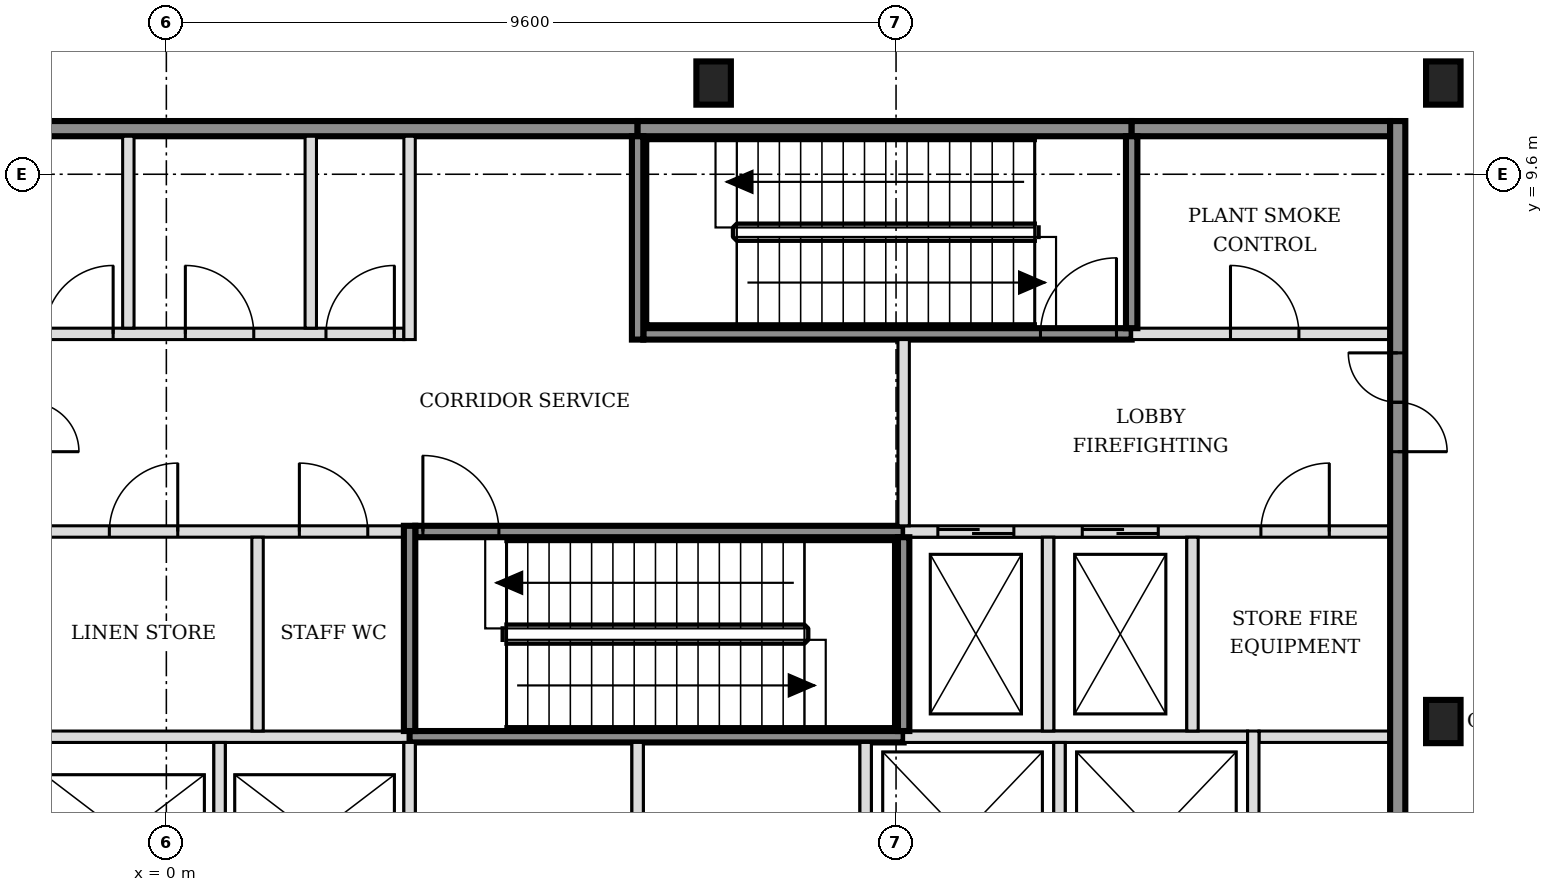
"""IFC4 building model, lengths in metres.
Left out: names, types, materials, properties, quantities, classifications, styles, units other than length and angle.
Written with IfcOpenShell. Run it as: python <this file> out.ifc"""

import sys

from ifc_helpers import new_model, si_unit, direction, frame, frame_2d, origin, origin_2d, place, context, subcontext, project, spatial, rectangle, i_section, extrude, element, fill, save


model = new_model("IFC4")
c1 = context("Model", 3, precision=1e-05, world=origin(), true_north=direction((0.0, 1.0)))
c2 = subcontext(c1, "Body", "Model", "MODEL_VIEW")
j1 = project(units=[si_unit("LENGTHUNIT", "METRE"), si_unit("PLANEANGLEUNIT", "RADIAN")], contexts=[c1])
p1 = place(None, origin())
s1 = spatial("IfcSite", under=j1, at=p1, CompositionType="ELEMENT")
p2 = place(p1, origin())
s2 = spatial("IfcBuilding", under=s1, at=p2, CompositionType="ELEMENT")
p3 = place(p2, frame((0.0, 0.0, 35.4)))
s3 = spatial("IfcBuildingStorey", under=s2, at=p3, CompositionType="ELEMENT", Elevation=35.4)
for number, where, z_axis, x_axis in (
    (1, (16.8, 2.4, -0.2), (0.0, 0.0, 1.0), (1.0, 0.0, 0.0)),
    (2, (7.2, 10.8, -0.2), (0.0, 0.0, 1.0), (1.0, 0.0, 0.0)),
    (3, (16.8, 10.8, -0.2), (0.0, 0.0, 1.0), (1.0, 0.0, 0.0)),
):
    element("IfcColumn", number, at=place(p3, frame(where, z_axis=z_axis, x_axis=x_axis)), inside=s3, PredefinedType="COLUMN", context=c2, shape_type="SweptSolid", body=[
        extrude(i_section(OverallWidth=0.454, OverallDepth=0.569, WebThickness=0.078, FlangeThickness=0.125, FilletRadius=0.015, at=origin_2d()), origin(), (0.0, 0.0, 1.0), 4.85),
    ])
p4 = place(p3, frame((-1.7, 2.2, 0.0), z_axis=(0.0, 0.0, 1.0), x_axis=(1.0, 0.0, 0.0)))
e4 = element("IfcWall", 4, at=p4, inside=s3, PredefinedType="SOLIDWALL", context=c2, shape_type="SweptSolid", body=[
    extrude(rectangle(XDim=4.9, YDim=0.15, at=frame_2d((2.45, 0.0))), origin(), (0.0, 0.0, 1.0), 4.65),
])
p5 = place(p3, frame((3.2, 2.2, 0.0), z_axis=(0.0, 0.0, 1.0), x_axis=(1.0, 0.0, 0.0)))
e5 = element("IfcWall", 5, at=p5, inside=s3, PredefinedType="SOLIDWALL", context=c2, shape_type="SweptSolid", body=[
    extrude(rectangle(XDim=6.5, YDim=0.15, at=frame_2d((3.25, 0.0))), origin(), (0.0, 0.0, 1.0), 4.65),
])
p6 = place(p3, frame((9.7, 2.2, 0.0), z_axis=(0.0, 0.0, 1.0), x_axis=(1.0, 0.0, 0.0)))
e6 = element("IfcWall", 6, at=p6, inside=s3, PredefinedType="SOLIDWALL", context=c2, shape_type="SweptSolid", body=[
    extrude(rectangle(XDim=4.525, YDim=0.15, at=frame_2d((2.263, 0.0))), origin(), (0.0, 0.0, 1.0), 4.65),
])
p7 = place(p3, frame((14.375, 2.2, 0.0), z_axis=(0.0, 0.0, 1.0), x_axis=(1.0, 0.0, 0.0)))
e7 = element("IfcWall", 7, at=p7, inside=s3, PredefinedType="PARTITIONING", context=c2, shape_type="SweptSolid", body=[
    extrude(rectangle(XDim=1.725, YDim=0.15, at=frame_2d((0.863, 0.0))), origin(), (0.0, 0.0, 1.0), 4.65),
])
p8 = place(p3, frame((-1.7, 4.9, 0.0), z_axis=(0.0, 0.0, 1.0), x_axis=(1.0, 0.0, 0.0)))
e8 = element("IfcWall", 8, at=p8, inside=s3, PredefinedType="PARTITIONING", context=c2, shape_type="SweptSolid", body=[
    extrude(rectangle(XDim=4.825, YDim=0.15, at=frame_2d((2.413, 0.0))), origin(), (0.0, 0.0, 1.0), 4.65),
])
p9 = place(p8, frame((0.95, 0.0, 0.0)))
e9 = element("IfcOpeningElement", 9, at=p9, cuts=e8, PredefinedType="OPENING", context=c2, shape_type="SweptSolid", body=[
    extrude(rectangle(XDim=0.9, YDim=2.1, at=frame_2d((0.45, 1.05))), frame((0.0, 0.085, 0.0), z_axis=(0.0, -1.0, 0.0), x_axis=(1.0, 0.0, 0.0)), (0.0, 0.0, 1.0), 0.17),
])
p10 = place(p8, frame((3.45, 0.0, 0.0)))
e10 = element("IfcOpeningElement", 10, at=p10, cuts=e8, PredefinedType="OPENING", context=c2, shape_type="SweptSolid", body=[
    extrude(rectangle(XDim=0.9, YDim=2.1, at=frame_2d((0.45, 1.05))), frame((0.0, 0.085, 0.0), z_axis=(0.0, -1.0, 0.0), x_axis=(1.0, 0.0, 0.0)), (0.0, 0.0, 1.0), 0.17),
])
p11 = place(p3, frame((3.275, 4.9, 0.0), z_axis=(0.0, 0.0, 1.0), x_axis=(1.0, 0.0, 0.0)))
e11 = element("IfcWall", 11, at=p11, inside=s3, PredefinedType="SOLIDWALL", context=c2, shape_type="SweptSolid", body=[
    extrude(rectangle(XDim=6.425, YDim=0.15, at=frame_2d((3.212, 0.0))), origin(), (0.0, 0.0, 1.0), 4.65),
])
p12 = place(p11, frame((0.1, 0.0, 0.0)))
e12 = element("IfcOpeningElement", 12, at=p12, cuts=e11, PredefinedType="OPENING", context=c2, shape_type="SweptSolid", body=[
    extrude(rectangle(XDim=1.0, YDim=2.1, at=frame_2d((0.5, 1.05))), frame((0.0, 0.085, 0.0), z_axis=(0.0, -1.0, 0.0), x_axis=(1.0, 0.0, 0.0)), (0.0, 0.0, 1.0), 0.17),
])
p13 = place(p3, frame((9.7, 4.9, 0.0), z_axis=(0.0, 0.0, 1.0), x_axis=(1.0, 0.0, 0.0)))
e13 = element("IfcWall", 13, at=p13, inside=s3, PredefinedType="SOLIDWALL", context=c2, shape_type="SweptSolid", body=[
    extrude(rectangle(XDim=6.4, YDim=0.15, at=frame_2d((3.2, 0.0))), origin(), (0.0, 0.0, 1.0), 4.65),
])
p14 = place(p13, frame((0.45, 0.0, 0.0)))
e14 = element("IfcOpeningElement", 14, at=p14, cuts=e13, PredefinedType="OPENING", context=c2, shape_type="SweptSolid", body=[
    extrude(rectangle(XDim=1.0, YDim=2.1, at=frame_2d((0.5, 1.05))), frame((0.0, 0.085, 0.0), z_axis=(0.0, -1.0, 0.0), x_axis=(1.0, 0.0, 0.0)), (0.0, 0.0, 1.0), 0.17),
])
p15 = place(p13, frame((2.35, 0.0, 0.0)))
e15 = element("IfcOpeningElement", 15, at=p15, cuts=e13, PredefinedType="OPENING", context=c2, shape_type="SweptSolid", body=[
    extrude(rectangle(XDim=1.0, YDim=2.1, at=frame_2d((0.5, 1.05))), frame((0.0, 0.085, 0.0), z_axis=(0.0, -1.0, 0.0), x_axis=(1.0, 0.0, 0.0)), (0.0, 0.0, 1.0), 0.17),
])
p16 = place(p13, frame((4.7, 0.0, 0.0)))
e16 = element("IfcOpeningElement", 16, at=p16, cuts=e13, PredefinedType="OPENING", context=c2, shape_type="SweptSolid", body=[
    extrude(rectangle(XDim=0.9, YDim=2.1, at=frame_2d((0.45, 1.05))), frame((0.0, 0.085, 0.0), z_axis=(0.0, -1.0, 0.0), x_axis=(1.0, 0.0, 0.0)), (0.0, 0.0, 1.0), 0.17),
])
p17 = place(p3, frame((-1.7, 7.5, 0.0), z_axis=(0.0, 0.0, 1.0), x_axis=(1.0, 0.0, 0.0)))
e17 = element("IfcWall", 17, at=p17, inside=s3, PredefinedType="PARTITIONING", context=c2, shape_type="SweptSolid", body=[
    extrude(rectangle(XDim=4.825, YDim=0.15, at=frame_2d((2.413, 0.0))), origin(), (0.0, 0.0, 1.0), 4.65),
])
p18 = place(p17, frame((0.1, 0.0, 0.0)))
e18 = element("IfcOpeningElement", 18, at=p18, cuts=e17, PredefinedType="OPENING", context=c2, shape_type="SweptSolid", body=[
    extrude(rectangle(XDim=0.9, YDim=2.1, at=frame_2d((0.45, 1.05))), frame((0.0, 0.085, 0.0), z_axis=(0.0, -1.0, 0.0), x_axis=(1.0, 0.0, 0.0)), (0.0, 0.0, 1.0), 0.17),
])
p19 = place(p17, frame((1.95, 0.0, 0.0)))
e19 = element("IfcOpeningElement", 19, at=p19, cuts=e17, PredefinedType="OPENING", context=c2, shape_type="SweptSolid", body=[
    extrude(rectangle(XDim=0.9, YDim=2.1, at=frame_2d((0.45, 1.05))), frame((0.0, 0.085, 0.0), z_axis=(0.0, -1.0, 0.0), x_axis=(1.0, 0.0, 0.0)), (0.0, 0.0, 1.0), 0.17),
])
p20 = place(p17, frame((3.8, 0.0, 0.0)))
e20 = element("IfcOpeningElement", 20, at=p20, cuts=e17, PredefinedType="OPENING", context=c2, shape_type="SweptSolid", body=[
    extrude(rectangle(XDim=0.9, YDim=2.1, at=frame_2d((0.45, 1.05))), frame((0.0, 0.085, 0.0), z_axis=(0.0, -1.0, 0.0), x_axis=(1.0, 0.0, 0.0)), (0.0, 0.0, 1.0), 0.17),
])
p21 = place(p3, frame((6.275, 7.5, 0.0), z_axis=(0.0, 0.0, 1.0), x_axis=(1.0, 0.0, 0.0)))
e21 = element("IfcWall", 21, at=p21, inside=s3, PredefinedType="SOLIDWALL", context=c2, shape_type="SweptSolid", body=[
    extrude(rectangle(XDim=6.425, YDim=0.15, at=frame_2d((3.212, 0.0))), origin(), (0.0, 0.0, 1.0), 4.65),
])
p22 = place(p21, frame((5.225, 0.0, 0.0)))
e22 = element("IfcOpeningElement", 22, at=p22, cuts=e21, PredefinedType="OPENING", context=c2, shape_type="SweptSolid", body=[
    extrude(rectangle(XDim=1.0, YDim=2.1, at=frame_2d((0.5, 1.05))), frame((0.0, 0.085, 0.0), z_axis=(0.0, -1.0, 0.0), x_axis=(1.0, 0.0, 0.0)), (0.0, 0.0, 1.0), 0.17),
])
p23 = place(p3, frame((12.7, 7.5, 0.0), z_axis=(0.0, 0.0, 1.0), x_axis=(1.0, 0.0, 0.0)))
e23 = element("IfcWall", 23, at=p23, inside=s3, PredefinedType="SOLIDWALL", context=c2, shape_type="SweptSolid", body=[
    extrude(rectangle(XDim=3.4, YDim=0.15, at=frame_2d((1.7, 0.0))), origin(), (0.0, 0.0, 1.0), 4.65),
])
p24 = place(p23, frame((1.3, 0.0, 0.0)))
e24 = element("IfcOpeningElement", 24, at=p24, cuts=e23, PredefinedType="OPENING", context=c2, shape_type="SweptSolid", body=[
    extrude(rectangle(XDim=0.9, YDim=2.1, at=frame_2d((0.45, 1.05))), frame((0.0, 0.085, 0.0), z_axis=(0.0, -1.0, 0.0), x_axis=(1.0, 0.0, 0.0)), (0.0, 0.0, 1.0), 0.17),
])
p25 = place(p3, frame((-1.7, 10.2, 0.0), z_axis=(0.0, 0.0, 1.0), x_axis=(1.0, 0.0, 0.0)))
e25 = element("IfcWall", 25, at=p25, inside=s3, PredefinedType="SOLIDWALL", context=c2, shape_type="SweptSolid", body=[
    extrude(rectangle(XDim=7.9, YDim=0.2, at=frame_2d((3.95, 0.0))), origin(), (0.0, 0.0, 1.0), 4.65),
])
p26 = place(p3, frame((6.2, 10.2, 0.0), z_axis=(0.0, 0.0, 1.0), x_axis=(1.0, 0.0, 0.0)))
e26 = element("IfcWall", 26, at=p26, inside=s3, PredefinedType="SOLIDWALL", context=c2, shape_type="SweptSolid", body=[
    extrude(rectangle(XDim=6.5, YDim=0.2, at=frame_2d((3.25, 0.0))), origin(), (0.0, 0.0, 1.0), 4.65),
])
p27 = place(p3, frame((12.7, 10.2, 0.0), z_axis=(0.0, 0.0, 1.0), x_axis=(1.0, 0.0, 0.0)))
e27 = element("IfcWall", 27, at=p27, inside=s3, PredefinedType="SOLIDWALL", context=c2, shape_type="SweptSolid", body=[
    extrude(rectangle(XDim=3.4, YDim=0.2, at=frame_2d((1.7, 0.0))), origin(), (0.0, 0.0, 1.0), 4.65),
])
p28 = place(p3, frame((-0.5, 7.575, 0.0), z_axis=(0.0, 0.0, 1.0), x_axis=(0.0, 1.0, 0.0)))
e28 = element("IfcWall", 28, at=p28, inside=s3, PredefinedType="PARTITIONING", context=c2, shape_type="SweptSolid", body=[
    extrude(rectangle(XDim=2.525, YDim=0.15, at=frame_2d((1.263, 0.0))), origin(), (0.0, 0.0, 1.0), 4.65),
])
p29 = place(p3, frame((0.7, -0.325, 0.0), z_axis=(0.0, 0.0, 1.0), x_axis=(0.0, 1.0, 0.0)))
e29 = element("IfcWall", 29, at=p29, inside=s3, PredefinedType="SOLIDWALL", context=c2, shape_type="SweptSolid", body=[
    extrude(rectangle(XDim=2.45, YDim=0.15, at=frame_2d((1.225, 0.0))), origin(), (0.0, 0.0, 1.0), 4.65),
])
p30 = place(p3, frame((1.2, 2.275, 0.0), z_axis=(0.0, 0.0, 1.0), x_axis=(0.0, 1.0, 0.0)))
e30 = element("IfcWall", 30, at=p30, inside=s3, PredefinedType="PARTITIONING", context=c2, shape_type="SweptSolid", body=[
    extrude(rectangle(XDim=2.55, YDim=0.15, at=frame_2d((1.275, 0.0))), origin(), (0.0, 0.0, 1.0), 4.65),
])
p31 = place(p3, frame((1.9, 7.575, 0.0), z_axis=(0.0, 0.0, 1.0), x_axis=(0.0, 1.0, 0.0)))
e31 = element("IfcWall", 31, at=p31, inside=s3, PredefinedType="PARTITIONING", context=c2, shape_type="SweptSolid", body=[
    extrude(rectangle(XDim=2.525, YDim=0.15, at=frame_2d((1.263, 0.0))), origin(), (0.0, 0.0, 1.0), 4.65),
])
p32 = place(p3, frame((3.2, -0.325, 0.0), z_axis=(0.0, 0.0, 1.0), x_axis=(0.0, 1.0, 0.0)))
e32 = element("IfcWall", 32, at=p32, inside=s3, PredefinedType="SOLIDWALL", context=c2, shape_type="SweptSolid", body=[
    extrude(rectangle(XDim=2.45, YDim=0.15, at=frame_2d((1.225, 0.0))), origin(), (0.0, 0.0, 1.0), 4.65),
])
p33 = place(p3, frame((3.2, 2.275, 0.0), z_axis=(0.0, 0.0, 1.0), x_axis=(0.0, 1.0, 0.0)))
e33 = element("IfcWall", 33, at=p33, inside=s3, PredefinedType="SOLIDWALL", context=c2, shape_type="SweptSolid", body=[
    extrude(rectangle(XDim=2.7, YDim=0.15, at=frame_2d((1.35, 0.0))), origin(), (0.0, 0.0, 1.0), 4.65),
])
p34 = place(p3, frame((3.2, 7.425, 0.0), z_axis=(0.0, 0.0, 1.0), x_axis=(0.0, 1.0, 0.0)))
e34 = element("IfcWall", 34, at=p34, inside=s3, PredefinedType="PARTITIONING", context=c2, shape_type="SweptSolid", body=[
    extrude(rectangle(XDim=2.675, YDim=0.15, at=frame_2d((1.337, 0.0))), origin(), (0.0, 0.0, 1.0), 4.65),
])
p35 = place(p3, frame((6.2, -0.325, 0.0), z_axis=(0.0, 0.0, 1.0), x_axis=(0.0, 1.0, 0.0)))
e35 = element("IfcWall", 35, at=p35, inside=s3, PredefinedType="SOLIDWALL", context=c2, shape_type="SweptSolid", body=[
    extrude(rectangle(XDim=2.45, YDim=0.15, at=frame_2d((1.225, 0.0))), origin(), (0.0, 0.0, 1.0), 4.65),
])
p36 = place(p3, frame((6.2, 7.425, 0.0), z_axis=(0.0, 0.0, 1.0), x_axis=(0.0, 1.0, 0.0)))
e36 = element("IfcWall", 36, at=p36, inside=s3, PredefinedType="SOLIDWALL", context=c2, shape_type="SweptSolid", body=[
    extrude(rectangle(XDim=2.675, YDim=0.15, at=frame_2d((1.337, 0.0))), origin(), (0.0, 0.0, 1.0), 4.65),
])
p37 = place(p3, frame((9.2, -0.325, 0.0), z_axis=(0.0, 0.0, 1.0), x_axis=(0.0, 1.0, 0.0)))
e37 = element("IfcWall", 37, at=p37, inside=s3, PredefinedType="SOLIDWALL", context=c2, shape_type="SweptSolid", body=[
    extrude(rectangle(XDim=2.45, YDim=0.15, at=frame_2d((1.225, 0.0))), origin(), (0.0, 0.0, 1.0), 4.65),
])
p38 = place(p3, frame((9.7, 2.275, 0.0), z_axis=(0.0, 0.0, 1.0), x_axis=(0.0, 1.0, 0.0)))
e38 = element("IfcWall", 38, at=p38, inside=s3, PredefinedType="SOLIDWALL", context=c2, shape_type="SweptSolid", body=[
    extrude(rectangle(XDim=2.55, YDim=0.15, at=frame_2d((1.275, 0.0))), origin(), (0.0, 0.0, 1.0), 4.65),
])
p39 = place(p3, frame((9.7, 4.975, 0.0), z_axis=(0.0, 0.0, 1.0), x_axis=(0.0, 1.0, 0.0)))
e39 = element("IfcWall", 39, at=p39, inside=s3, PredefinedType="SOLIDWALL", context=c2, shape_type="SweptSolid", body=[
    extrude(rectangle(XDim=2.45, YDim=0.15, at=frame_2d((1.225, 0.0))), origin(), (0.0, 0.0, 1.0), 4.65),
])
p40 = place(p3, frame((11.6, 2.275, 0.0), z_axis=(0.0, 0.0, 1.0), x_axis=(0.0, 1.0, 0.0)))
e40 = element("IfcWall", 40, at=p40, inside=s3, PredefinedType="SOLIDWALL", context=c2, shape_type="SweptSolid", body=[
    extrude(rectangle(XDim=2.55, YDim=0.15, at=frame_2d((1.275, 0.0))), origin(), (0.0, 0.0, 1.0), 4.65),
])
p41 = place(p3, frame((11.75, -0.325, 0.0), z_axis=(0.0, 0.0, 1.0), x_axis=(0.0, 1.0, 0.0)))
e41 = element("IfcWall", 41, at=p41, inside=s3, PredefinedType="SOLIDWALL", context=c2, shape_type="SweptSolid", body=[
    extrude(rectangle(XDim=2.45, YDim=0.15, at=frame_2d((1.225, 0.0))), origin(), (0.0, 0.0, 1.0), 4.65),
])
p42 = place(p3, frame((12.7, 7.575, 0.0), z_axis=(0.0, 0.0, 1.0), x_axis=(0.0, 1.0, 0.0)))
e42 = element("IfcWall", 42, at=p42, inside=s3, PredefinedType="SOLIDWALL", context=c2, shape_type="SweptSolid", body=[
    extrude(rectangle(XDim=2.525, YDim=0.15, at=frame_2d((1.263, 0.0))), origin(), (0.0, 0.0, 1.0), 4.65),
])
p43 = place(p3, frame((13.5, 2.275, 0.0), z_axis=(0.0, 0.0, 1.0), x_axis=(0.0, 1.0, 0.0)))
e43 = element("IfcWall", 43, at=p43, inside=s3, PredefinedType="SOLIDWALL", context=c2, shape_type="SweptSolid", body=[
    extrude(rectangle(XDim=2.55, YDim=0.15, at=frame_2d((1.275, 0.0))), origin(), (0.0, 0.0, 1.0), 4.65),
])
p44 = place(p3, frame((14.3, -0.475, 0.0), z_axis=(0.0, 0.0, 1.0), x_axis=(0.0, 1.0, 0.0)))
e44 = element("IfcWall", 44, at=p44, inside=s3, PredefinedType="SOLIDWALL", context=c2, shape_type="SweptSolid", body=[
    extrude(rectangle(XDim=2.75, YDim=0.15, at=frame_2d((1.375, 0.0))), origin(), (0.0, 0.0, 1.0), 4.65),
])
p45 = place(p3, frame((16.2, -5.5, 0.0), z_axis=(0.0, 0.0, 1.0), x_axis=(0.0, 1.0, 0.0)))
e45 = element("IfcWall", 45, at=p45, inside=s3, PredefinedType="SOLIDWALL", context=c2, shape_type="SweptSolid", body=[
    extrude(rectangle(XDim=15.8, YDim=0.2, at=frame_2d((7.9, 0.0))), origin(), (0.0, 0.0, 1.0), 4.65),
])
p46 = place(p45, frame((3.05, 0.0, 0.0)))
e46 = element("IfcOpeningElement", 46, at=p46, cuts=e45, PredefinedType="OPENING", context=c2, shape_type="SweptSolid", body=[
    extrude(rectangle(XDim=1.3, YDim=2.1, at=frame_2d((0.65, 1.05))), frame((0.0, 0.11, 0.0), z_axis=(0.0, -1.0, 0.0), x_axis=(1.0, 0.0, 0.0)), (0.0, 0.0, 1.0), 0.22),
])
p47 = place(p45, frame((11.45, 0.0, 0.0)))
e47 = element("IfcOpeningElement", 47, at=p47, cuts=e45, PredefinedType="OPENING", context=c2, shape_type="SweptSolid", body=[
    extrude(rectangle(XDim=1.3, YDim=2.1, at=frame_2d((0.65, 1.05))), frame((0.0, 0.11, 0.0), z_axis=(0.0, -1.0, 0.0), x_axis=(1.0, 0.0, 0.0)), (0.0, 0.0, 1.0), 0.22),
])
p48 = place(p14, origin())
e48 = element("IfcDoor", 48, at=p48, inside=s3, OperationType="DOUBLE_DOOR_SLIDING", PredefinedType="DOOR", context=c2, shape_type="SweptSolid", body=[
    extrude(rectangle(XDim=1.0, YDim=2.1, at=frame_2d((0.5, 1.05))), frame((0.0, 0.025, 0.0), z_axis=(0.0, -1.0, 0.0), x_axis=(1.0, 0.0, 0.0)), (0.0, 0.0, 1.0), 0.05),
])
fill(e14, e48)
p49 = place(p15, origin())
e49 = element("IfcDoor", 49, at=p49, inside=s3, OperationType="DOUBLE_DOOR_SLIDING", PredefinedType="DOOR", context=c2, shape_type="SweptSolid", body=[
    extrude(rectangle(XDim=1.0, YDim=2.1, at=frame_2d((0.5, 1.05))), frame((0.0, 0.025, 0.0), z_axis=(0.0, -1.0, 0.0), x_axis=(1.0, 0.0, 0.0)), (0.0, 0.0, 1.0), 0.05),
])
fill(e15, e49)
p50 = place(p12, origin())
e50 = element("IfcDoor", 50, at=p50, inside=s3, OperationType="SINGLE_SWING_LEFT", PredefinedType="DOOR", context=c2, shape_type="SweptSolid", body=[
    extrude(rectangle(XDim=1.0, YDim=2.1, at=frame_2d((0.5, 1.05))), frame((0.0, 0.025, 0.0), z_axis=(0.0, -1.0, 0.0), x_axis=(1.0, 0.0, 0.0)), (0.0, 0.0, 1.0), 0.05),
])
fill(e12, e50)
p51 = place(p22, origin())
e51 = element("IfcDoor", 51, at=p51, inside=s3, OperationType="SINGLE_SWING_RIGHT", PredefinedType="DOOR", context=c2, shape_type="SweptSolid", body=[
    extrude(rectangle(XDim=1.0, YDim=2.1, at=frame_2d((0.5, 1.05))), frame((0.0, 0.025, 0.0), z_axis=(0.0, -1.0, 0.0), x_axis=(1.0, 0.0, 0.0)), (0.0, 0.0, 1.0), 0.05),
])
fill(e22, e51)
p52 = place(p47, origin())
e52 = element("IfcDoor", 52, at=p52, inside=s3, OperationType="DOUBLE_DOOR_SINGLE_SWING", PredefinedType="DOOR", context=c2, shape_type="SweptSolid", body=[
    extrude(rectangle(XDim=1.3, YDim=2.1, at=frame_2d((0.65, 1.05))), frame((0.0, 0.025, 0.0), z_axis=(0.0, -1.0, 0.0), x_axis=(1.0, 0.0, 0.0)), (0.0, 0.0, 1.0), 0.05),
])
fill(e47, e52)
p53 = place(p16, origin())
e53 = element("IfcDoor", 53, at=p53, inside=s3, OperationType="SINGLE_SWING_RIGHT", PredefinedType="DOOR", context=c2, shape_type="SweptSolid", body=[
    extrude(rectangle(XDim=0.9, YDim=2.1, at=frame_2d((0.45, 1.05))), frame((0.0, 0.025, 0.0), z_axis=(0.0, -1.0, 0.0), x_axis=(1.0, 0.0, 0.0)), (0.0, 0.0, 1.0), 0.05),
])
fill(e16, e53)
p54 = place(p24, origin())
e54 = element("IfcDoor", 54, at=p54, inside=s3, OperationType="SINGLE_SWING_LEFT", PredefinedType="DOOR", context=c2, shape_type="SweptSolid", body=[
    extrude(rectangle(XDim=0.9, YDim=2.1, at=frame_2d((0.45, 1.05))), frame((0.0, 0.025, 0.0), z_axis=(0.0, -1.0, 0.0), x_axis=(1.0, 0.0, 0.0)), (0.0, 0.0, 1.0), 0.05),
])
fill(e24, e54)
p55 = place(p9, origin())
e55 = element("IfcDoor", 55, at=p55, inside=s3, OperationType="SINGLE_SWING_RIGHT", PredefinedType="DOOR", context=c2, shape_type="SweptSolid", body=[
    extrude(rectangle(XDim=0.9, YDim=2.1, at=frame_2d((0.45, 1.05))), frame((0.0, 0.025, 0.0), z_axis=(0.0, -1.0, 0.0), x_axis=(1.0, 0.0, 0.0)), (0.0, 0.0, 1.0), 0.05),
])
fill(e9, e55)
p56 = place(p10, origin())
e56 = element("IfcDoor", 56, at=p56, inside=s3, OperationType="SINGLE_SWING_LEFT", PredefinedType="DOOR", context=c2, shape_type="SweptSolid", body=[
    extrude(rectangle(XDim=0.9, YDim=2.1, at=frame_2d((0.45, 1.05))), frame((0.0, 0.025, 0.0), z_axis=(0.0, -1.0, 0.0), x_axis=(1.0, 0.0, 0.0)), (0.0, 0.0, 1.0), 0.05),
])
fill(e10, e56)
p57 = place(p18, origin())
e57 = element("IfcDoor", 57, at=p57, inside=s3, OperationType="SINGLE_SWING_RIGHT", PredefinedType="DOOR", context=c2, shape_type="SweptSolid", body=[
    extrude(rectangle(XDim=0.9, YDim=2.1, at=frame_2d((0.45, 1.05))), frame((0.0, 0.025, 0.0), z_axis=(0.0, -1.0, 0.0), x_axis=(1.0, 0.0, 0.0)), (0.0, 0.0, 1.0), 0.05),
])
fill(e18, e57)
p58 = place(p19, origin())
e58 = element("IfcDoor", 58, at=p58, inside=s3, OperationType="SINGLE_SWING_LEFT", PredefinedType="DOOR", context=c2, shape_type="SweptSolid", body=[
    extrude(rectangle(XDim=0.9, YDim=2.1, at=frame_2d((0.45, 1.05))), frame((0.0, 0.025, 0.0), z_axis=(0.0, -1.0, 0.0), x_axis=(1.0, 0.0, 0.0)), (0.0, 0.0, 1.0), 0.05),
])
fill(e19, e58)
p59 = place(p20, origin())
e59 = element("IfcDoor", 59, at=p59, inside=s3, OperationType="SINGLE_SWING_RIGHT", PredefinedType="DOOR", context=c2, shape_type="SweptSolid", body=[
    extrude(rectangle(XDim=0.9, YDim=2.1, at=frame_2d((0.45, 1.05))), frame((0.0, 0.025, 0.0), z_axis=(0.0, -1.0, 0.0), x_axis=(1.0, 0.0, 0.0)), (0.0, 0.0, 1.0), 0.05),
])
fill(e20, e59)
save(model, sys.argv[1])
